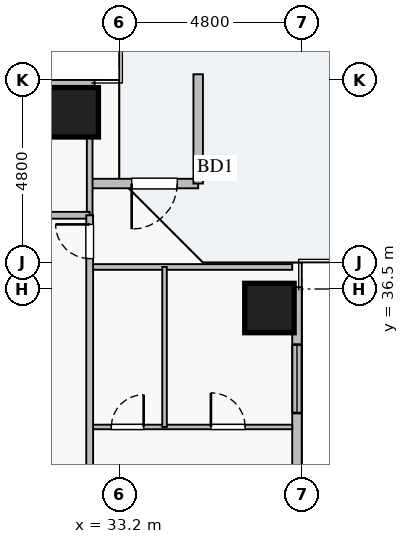
"""IFC4 building model, lengths in metres.
Left out: names, types, materials, properties, quantities, classifications, styles, units other than length and angle.
Written with IfcOpenShell. Run it as: python <this file> out.ifc"""

import sys

from ifc_helpers import new_model, si_unit, direction, frame, frame_2d, origin, origin_2d, place, context, subcontext, project, spatial, rectangle, extrude, source, transform, mapped, element, fill, save


model = new_model("IFC4")
c1 = context("Model", 3, precision=1e-05, world=origin(), true_north=direction((0.0, 1.0)))
c2 = subcontext(c1, "Body", "Model", "MODEL_VIEW")
j1 = project(units=[si_unit("LENGTHUNIT", "METRE"), si_unit("PLANEANGLEUNIT", "RADIAN")], contexts=[c1])
p1 = place(None, origin())
s1 = spatial("IfcSite", under=j1, at=p1, CompositionType="ELEMENT")
p2 = place(p1, origin())
s2 = spatial("IfcBuilding", under=s1, at=p2, CompositionType="ELEMENT")
p3 = place(p2, frame((0.0, 0.0, 32.75)))
s3 = spatial("IfcBuildingStorey", under=s2, at=p3, CompositionType="ELEMENT", Elevation=32.75)
m1 = source(origin(), c2, "Body", "SweptSolid", [
    extrude(rectangle(XDim=1.3, YDim=1.3, at=origin_2d()), origin(), (0.0, 0.0, 1.0), 3.25),
])
for number, where, z_axis, x_axis in (
    (1, (37.15, 36.0, 0.0), (0.0, 0.0, 1.0), (1.0, 0.0, 0.0)),
    (2, (32.0, 41.15, 0.0), (0.0, 0.0, 1.0), (1.0, 0.0, 0.0)),
):
    element("IfcColumn", number, at=place(p3, frame(where, z_axis=z_axis, x_axis=x_axis)), inside=s3, PredefinedType="COLUMN", context=c2, shape_type="MappedRepresentation", body=[
        mapped(m1, transform((0.0, 0.0, 0.0), x_axis=(1.0, 0.0, 0.0), y_axis=(0.0, 1.0, 0.0), z_axis=(0.0, 0.0, 1.0), scale=1.0)),
    ])
p4 = place(p3, frame((5.45, 41.875, 0.0), z_axis=(0.0, 0.0, 1.0), x_axis=(1.0, 0.0, 0.0)))
e3 = element("IfcWall", 3, at=p4, inside=s3, PredefinedType="STANDARD", context=c2, shape_type="SweptSolid", body=[
    extrude(rectangle(XDim=27.1, YDim=0.25, at=frame_2d((13.55, 0.0))), origin(), (0.0, 0.0, 1.0), 2.61),
])
p5 = place(p4, frame((14.4, 0.0, 0.0)))
e4 = element("IfcOpeningElement", 4, at=p5, cuts=e3, PredefinedType="OPENING", context=c2, shape_type="SweptSolid", body=[
    extrude(rectangle(XDim=1.2, YDim=2.1, at=frame_2d((0.6, 1.05))), frame((0.0, 0.135, 0.0), z_axis=(0.0, -1.0, 0.0), x_axis=(1.0, 0.0, 0.0)), (0.0, 0.0, 1.0), 0.27),
])
p6 = place(p4, frame((1.365, 0.0, 0.9)))
e5 = element("IfcOpeningElement", 5, at=p6, cuts=e3, PredefinedType="OPENING", context=c2, shape_type="SweptSolid", body=[
    extrude(rectangle(XDim=1.8, YDim=1.5, at=frame_2d((0.9, 0.75))), frame((0.0, 0.135, 0.0), z_axis=(0.0, -1.0, 0.0), x_axis=(1.0, 0.0, 0.0)), (0.0, 0.0, 1.0), 0.27),
])
p7 = place(p4, frame((9.263, 0.0, 0.9)))
e6 = element("IfcOpeningElement", 6, at=p7, cuts=e3, PredefinedType="OPENING", context=c2, shape_type="SweptSolid", body=[
    extrude(rectangle(XDim=1.8, YDim=1.45, at=frame_2d((0.9, 0.725))), frame((0.0, 0.135, 0.0), z_axis=(0.0, -1.0, 0.0), x_axis=(1.0, 0.0, 0.0)), (0.0, 0.0, 1.0), 0.27),
])
p8 = place(p4, frame((16.188, 0.0, 0.9)))
e7 = element("IfcOpeningElement", 7, at=p8, cuts=e3, PredefinedType="OPENING", context=c2, shape_type="SweptSolid", body=[
    extrude(rectangle(XDim=1.5, YDim=1.45, at=frame_2d((0.75, 0.725))), frame((0.0, 0.135, 0.0), z_axis=(0.0, -1.0, 0.0), x_axis=(1.0, 0.0, 0.0)), (0.0, 0.0, 1.0), 0.27),
])
p9 = place(p4, frame((22.663, 0.0, 0.9)))
e8 = element("IfcOpeningElement", 8, at=p9, cuts=e3, PredefinedType="OPENING", context=c2, shape_type="SweptSolid", body=[
    extrude(rectangle(XDim=2.1, YDim=1.48, at=frame_2d((1.05, 0.74))), frame((0.0, 0.135, 0.0), z_axis=(0.0, -1.0, 0.0), x_axis=(1.0, 0.0, 0.0)), (0.0, 0.0, 1.0), 0.27),
])
p10 = place(p4, frame((5.149, 0.0, 0.9)))
e9 = element("IfcOpeningElement", 9, at=p10, cuts=e3, PredefinedType="OPENING", context=c2, shape_type="SweptSolid", body=[
    extrude(rectangle(XDim=2.4, YDim=1.5, at=frame_2d((1.2, 0.75))), frame((0.0, 0.135, 0.0), z_axis=(0.0, -1.0, 0.0), x_axis=(1.0, 0.0, 0.0)), (0.0, 0.0, 1.0), 0.27),
])
p11 = place(p3, frame((37.875, 9.45, 0.0), z_axis=(0.0, 0.0, 1.0), x_axis=(0.0, 1.0, 0.0)))
e10 = element("IfcWall", 10, at=p11, inside=s3, PredefinedType="STANDARD", context=c2, shape_type="SweptSolid", body=[
    extrude(rectangle(XDim=27.1, YDim=0.25, at=frame_2d((13.55, 0.0))), origin(), (0.0, 0.0, 1.0), 2.61),
])
p12 = place(p11, frame((14.4, 0.0, 0.0)))
e11 = element("IfcOpeningElement", 11, at=p12, cuts=e10, PredefinedType="OPENING", context=c2, shape_type="SweptSolid", body=[
    extrude(rectangle(XDim=1.2, YDim=2.1, at=frame_2d((0.6, 1.05))), frame((0.0, 0.135, 0.0), z_axis=(0.0, -1.0, 0.0), x_axis=(1.0, 0.0, 0.0)), (0.0, 0.0, 1.0), 0.27),
])
p13 = place(p11, frame((1.552, 0.0, 0.9)))
e12 = element("IfcOpeningElement", 12, at=p13, cuts=e10, PredefinedType="OPENING", context=c2, shape_type="SweptSolid", body=[
    extrude(rectangle(XDim=2.4, YDim=1.5, at=frame_2d((1.2, 0.75))), frame((0.0, 0.135, 0.0), z_axis=(0.0, -1.0, 0.0), x_axis=(1.0, 0.0, 0.0)), (0.0, 0.0, 1.0), 0.27),
])
p14 = place(p11, frame((23.788, 0.0, 0.9)))
e13 = element("IfcOpeningElement", 13, at=p14, cuts=e10, PredefinedType="OPENING", context=c2, shape_type="SweptSolid", body=[
    extrude(rectangle(XDim=1.8, YDim=1.5, at=frame_2d((0.9, 0.75))), frame((0.0, 0.135, 0.0), z_axis=(0.0, -1.0, 0.0), x_axis=(1.0, 0.0, 0.0)), (0.0, 0.0, 1.0), 0.27),
])
p15 = place(p11, frame((19.758, 0.0, 0.9)))
e14 = element("IfcOpeningElement", 14, at=p15, cuts=e10, PredefinedType="OPENING", context=c2, shape_type="SweptSolid", body=[
    extrude(rectangle(XDim=2.4, YDim=1.5, at=frame_2d((1.2, 0.75))), frame((0.0, 0.135, 0.0), z_axis=(0.0, -1.0, 0.0), x_axis=(1.0, 0.0, 0.0)), (0.0, 0.0, 1.0), 0.27),
])
p16 = place(p11, frame((8.755, 0.0, 0.9)))
e15 = element("IfcOpeningElement", 15, at=p16, cuts=e10, PredefinedType="OPENING", context=c2, shape_type="SweptSolid", body=[
    extrude(rectangle(XDim=0.9, YDim=1.2, at=frame_2d((0.45, 0.6))), frame((0.0, 0.135, 0.0), z_axis=(0.0, -1.0, 0.0), x_axis=(1.0, 0.0, 0.0)), (0.0, 0.0, 1.0), 0.27),
])
p17 = place(p3, frame((32.475, 39.275, 0.0), z_axis=(0.0, 0.0, 1.0), x_axis=(1.0, 0.0, 0.0)))
e16 = element("IfcWall", 16, at=p17, inside=s3, PredefinedType="STANDARD", context=c2, shape_type="SweptSolid", body=[
    extrude(rectangle(XDim=2.8, YDim=0.25, at=frame_2d((1.4, 0.0))), origin(), (0.0, 0.0, 1.0), 2.61),
])
p18 = place(p17, frame((1.05, 0.0, 0.0)))
e17 = element("IfcOpeningElement", 17, at=p18, cuts=e16, PredefinedType="OPENING", context=c2, shape_type="SweptSolid", body=[
    extrude(rectangle(XDim=1.2, YDim=2.1, at=frame_2d((0.6, 1.05))), frame((0.0, 0.135, 0.0), z_axis=(0.0, -1.0, 0.0), x_axis=(1.0, 0.0, 0.0)), (0.0, 0.0, 1.0), 0.27),
])
p19 = place(p3, frame((35.275, 39.275, 0.0), z_axis=(0.0, 0.0, 1.0), x_axis=(0.0, 1.0, 0.0)))
e18 = element("IfcWall", 18, at=p19, inside=s3, PredefinedType="STANDARD", context=c2, shape_type="SweptSolid", body=[
    extrude(rectangle(XDim=2.875, YDim=0.25, at=frame_2d((1.438, 0.0))), origin(), (0.0, 0.0, 1.0), 2.61),
])
p20 = place(p3, frame((32.42, 38.44, 0.0), z_axis=(0.0, 0.0, 1.0), x_axis=(0.0, 1.0, 0.0)))
e19 = element("IfcWall", 19, at=p20, inside=s3, PredefinedType="PARTITIONING", context=c2, shape_type="SweptSolid", body=[
    extrude(rectangle(XDim=3.31, YDim=0.15, at=frame_2d((1.655, 0.0))), origin(), (0.0, 0.0, 1.0), 3.07),
])
p21 = place(p3, frame((8.85, 38.44, 0.0), z_axis=(0.0, 0.0, 1.0), x_axis=(1.0, 0.0, 0.0)))
e20 = element("IfcWall", 20, at=p21, inside=s3, PredefinedType="PARTITIONING", context=c2, shape_type="SweptSolid", body=[
    extrude(rectangle(XDim=23.57, YDim=0.18, at=frame_2d((11.785, 0.0))), origin(), (0.0, 0.0, 1.0), 3.07),
])
p22 = place(p21, frame((3.77, 0.0, 0.0)))
e21 = element("IfcOpeningElement", 21, at=p22, cuts=e20, PredefinedType="OPENING", context=c2, shape_type="SweptSolid", body=[
    extrude(rectangle(XDim=1.0, YDim=2.05, at=frame_2d((0.5, 1.025))), frame((0.0, 0.1, 0.0), z_axis=(0.0, -1.0, 0.0), x_axis=(1.0, 0.0, 0.0)), (0.0, 0.0, 1.0), 0.2),
])
p23 = place(p21, frame((11.625, 0.0, 0.0)))
e22 = element("IfcOpeningElement", 22, at=p23, cuts=e20, PredefinedType="OPENING", context=c2, shape_type="SweptSolid", body=[
    extrude(rectangle(XDim=1.0, YDim=2.05, at=frame_2d((0.5, 1.025))), frame((0.0, 0.1, 0.0), z_axis=(0.0, -1.0, 0.0), x_axis=(1.0, 0.0, 0.0)), (0.0, 0.0, 1.0), 0.2),
])
p24 = place(p21, frame((19.14, 0.0, 0.0)))
e23 = element("IfcOpeningElement", 23, at=p24, cuts=e20, PredefinedType="OPENING", context=c2, shape_type="SweptSolid", body=[
    extrude(rectangle(XDim=1.0, YDim=2.05, at=frame_2d((0.5, 1.025))), frame((0.0, 0.1, 0.0), z_axis=(0.0, -1.0, 0.0), x_axis=(1.0, 0.0, 0.0)), (0.0, 0.0, 1.0), 0.2),
])
p25 = place(p3, frame((32.42, 37.08, 0.0), z_axis=(0.0, 0.0, 1.0), x_axis=(1.0, 0.0, 0.0)))
e24 = element("IfcWall", 24, at=p25, inside=s3, PredefinedType="PARTITIONING", context=c2, shape_type="SweptSolid", body=[
    extrude(rectangle(XDim=5.33, YDim=0.15, at=frame_2d((2.665, 0.0))), origin(), (0.0, 0.0, 1.0), 3.07),
])
p26 = place(p3, frame((32.42, 32.87, 0.0), z_axis=(0.0, 0.0, 1.0), x_axis=(1.0, 0.0, 0.0)))
e25 = element("IfcWall", 25, at=p26, inside=s3, PredefinedType="PLUMBINGWALL", context=c2, shape_type="SweptSolid", body=[
    extrude(rectangle(XDim=5.33, YDim=0.12, at=frame_2d((2.665, 0.0))), origin(), (0.0, 0.0, 1.0), 3.07),
])
p27 = place(p26, frame((0.57, 0.0, 0.0)))
e26 = element("IfcOpeningElement", 26, at=p27, cuts=e25, PredefinedType="OPENING", context=c2, shape_type="SweptSolid", body=[
    extrude(rectangle(XDim=0.85, YDim=2.05, at=frame_2d((0.425, 1.025))), frame((0.0, 0.07, 0.0), z_axis=(0.0, -1.0, 0.0), x_axis=(1.0, 0.0, 0.0)), (0.0, 0.0, 1.0), 0.14),
])
p28 = place(p26, frame((3.19, 0.0, 0.0)))
e27 = element("IfcOpeningElement", 27, at=p28, cuts=e25, PredefinedType="OPENING", context=c2, shape_type="SweptSolid", body=[
    extrude(rectangle(XDim=0.9, YDim=2.05, at=frame_2d((0.45, 1.025))), frame((0.0, 0.07, 0.0), z_axis=(0.0, -1.0, 0.0), x_axis=(1.0, 0.0, 0.0)), (0.0, 0.0, 1.0), 0.14),
])
p29 = place(p3, frame((34.39, 32.87, 0.0), z_axis=(0.0, 0.0, 1.0), x_axis=(0.0, 1.0, 0.0)))
e28 = element("IfcWall", 28, at=p29, inside=s3, PredefinedType="PLUMBINGWALL", context=c2, shape_type="SweptSolid", body=[
    extrude(rectangle(XDim=4.21, YDim=0.12, at=frame_2d((2.105, 0.0))), origin(), (0.0, 0.0, 1.0), 3.07),
])
p30 = place(p3, frame((32.42, 7.21, 0.0), z_axis=(0.0, 0.0, 1.0), x_axis=(0.0, 1.0, 0.0)))
e29 = element("IfcWall", 29, at=p30, inside=s3, PredefinedType="PARTITIONING", context=c2, shape_type="SweptSolid", body=[
    extrude(rectangle(XDim=31.23, YDim=0.18, at=frame_2d((15.615, 0.0))), origin(), (0.0, 0.0, 1.0), 2.771),
])
p31 = place(p30, frame((30.09, 0.0, 0.0)))
e30 = element("IfcOpeningElement", 30, at=p31, cuts=e29, PredefinedType="OPENING", context=c2, shape_type="SweptSolid", body=[
    extrude(rectangle(XDim=0.9, YDim=2.05, at=frame_2d((0.45, 1.025))), frame((0.0, 0.1, 0.0), z_axis=(0.0, -1.0, 0.0), x_axis=(1.0, 0.0, 0.0)), (0.0, 0.0, 1.0), 0.2),
])
p32 = place(p30, frame((0.415, 0.0, 0.0)))
e31 = element("IfcOpeningElement", 31, at=p32, cuts=e29, PredefinedType="OPENING", context=c2, shape_type="SweptSolid", body=[
    extrude(rectangle(XDim=0.9, YDim=2.05, at=frame_2d((0.45, 1.025))), frame((0.0, 0.1, 0.0), z_axis=(0.0, -1.0, 0.0), x_axis=(1.0, 0.0, 0.0)), (0.0, 0.0, 1.0), 0.2),
])
p33 = place(p30, frame((3.465, 0.0, 0.0)))
e32 = element("IfcOpeningElement", 32, at=p33, cuts=e29, PredefinedType="OPENING", context=c2, shape_type="SweptSolid", body=[
    extrude(rectangle(XDim=1.0, YDim=2.05, at=frame_2d((0.5, 1.025))), frame((0.0, 0.1, 0.0), z_axis=(0.0, -1.0, 0.0), x_axis=(1.0, 0.0, 0.0)), (0.0, 0.0, 1.0), 0.2),
])
p34 = place(p30, frame((12.635, 0.0, 0.0)))
e33 = element("IfcOpeningElement", 33, at=p34, cuts=e29, PredefinedType="OPENING", context=c2, shape_type="SweptSolid", body=[
    extrude(rectangle(XDim=1.0, YDim=2.05, at=frame_2d((0.5, 1.025))), frame((0.0, 0.1, 0.0), z_axis=(0.0, -1.0, 0.0), x_axis=(1.0, 0.0, 0.0)), (0.0, 0.0, 1.0), 0.2),
])
p35 = place(p30, frame((22.5, 0.0, 0.0)))
e34 = element("IfcOpeningElement", 34, at=p35, cuts=e29, PredefinedType="OPENING", context=c2, shape_type="SweptSolid", body=[
    extrude(rectangle(XDim=1.0, YDim=2.05, at=frame_2d((0.5, 1.025))), frame((0.0, 0.1, 0.0), z_axis=(0.0, -1.0, 0.0), x_axis=(1.0, 0.0, 0.0)), (0.0, 0.0, 1.0), 0.2),
])
m2 = source(origin(), c2, "Body", "SweptSolid", [
    extrude(rectangle(XDim=1.8, YDim=1.5, at=frame_2d((0.9, 0.75))), frame((0.0, 0.03, 0.0), z_axis=(0.0, -1.0, 0.0), x_axis=(1.0, 0.0, 0.0)), (0.0, 0.0, 1.0), 0.06),
])
p36 = place(p14, origin())
e35 = element("IfcWindow", 35, at=p36, inside=s3, PartitioningType="TRIPLE_PANEL_VERTICAL", PredefinedType="WINDOW", context=c2, shape_type="MappedRepresentation", body=[
    mapped(m2, transform((0.0, 0.0, 0.0), x_axis=(1.0, 0.0, 0.0), y_axis=(0.0, 1.0, 0.0), z_axis=(0.0, 0.0, 1.0), scale=1.0)),
])
fill(e13, e35)
m3 = source(origin(), c2, "Body", "SweptSolid", [
    extrude(rectangle(XDim=1.2, YDim=2.1, at=frame_2d((0.6, 1.05))), frame((0.0, 0.025, 0.0), z_axis=(0.0, -1.0, 0.0), x_axis=(1.0, 0.0, 0.0)), (0.0, 0.0, 1.0), 0.05),
])
p37 = place(p18, frame((1.2, 0.0, 0.0), z_axis=(0.0, 0.0, 1.0), x_axis=(-1.0, 0.0, 0.0)))
e36 = element("IfcDoor", 36, at=p37, inside=s3, OperationType="SINGLE_SWING_LEFT", PredefinedType="DOOR", context=c2, shape_type="MappedRepresentation", body=[
    mapped(m3, transform((0.0, 0.0, 0.0), x_axis=(1.0, 0.0, 0.0), y_axis=(0.0, 1.0, 0.0), z_axis=(0.0, 0.0, 1.0), scale=1.0)),
])
fill(e17, e36)
m4 = source(origin(), c2, "Body", "SweptSolid", [
    extrude(rectangle(XDim=0.85, YDim=2.05, at=frame_2d((0.425, 1.025))), frame((0.0, 0.025, 0.0), z_axis=(0.0, -1.0, 0.0), x_axis=(1.0, 0.0, 0.0)), (0.0, 0.0, 1.0), 0.05),
])
p38 = place(p27, origin())
e37 = element("IfcDoor", 37, at=p38, inside=s3, OperationType="SINGLE_SWING_RIGHT", PredefinedType="DOOR", context=c2, shape_type="MappedRepresentation", body=[
    mapped(m4, transform((0.0, 0.0, 0.0), x_axis=(1.0, 0.0, 0.0), y_axis=(0.0, 1.0, 0.0), z_axis=(0.0, 0.0, 1.0), scale=1.0)),
])
fill(e26, e37)
m5 = source(origin(), c2, "Body", "SweptSolid", [
    extrude(rectangle(XDim=0.9, YDim=2.05, at=frame_2d((0.45, 1.025))), frame((0.0, 0.025, 0.0), z_axis=(0.0, -1.0, 0.0), x_axis=(1.0, 0.0, 0.0)), (0.0, 0.0, 1.0), 0.05),
])
p39 = place(p28, origin())
e38 = element("IfcDoor", 38, at=p39, inside=s3, OperationType="SINGLE_SWING_LEFT", PredefinedType="DOOR", context=c2, shape_type="MappedRepresentation", body=[
    mapped(m5, transform((0.0, 0.0, 0.0), x_axis=(1.0, 0.0, 0.0), y_axis=(0.0, 1.0, 0.0), z_axis=(0.0, 0.0, 1.0), scale=1.0)),
])
fill(e27, e38)
p40 = place(p31, origin())
e39 = element("IfcDoor", 39, at=p40, inside=s3, OperationType="SINGLE_SWING_RIGHT", PredefinedType="DOOR", context=c2, shape_type="MappedRepresentation", body=[
    mapped(m5, transform((0.0, 0.0, 0.0), x_axis=(1.0, 0.0, 0.0), y_axis=(0.0, 1.0, 0.0), z_axis=(0.0, 0.0, 1.0), scale=1.0)),
])
fill(e30, e39)
save(model, sys.argv[1])
